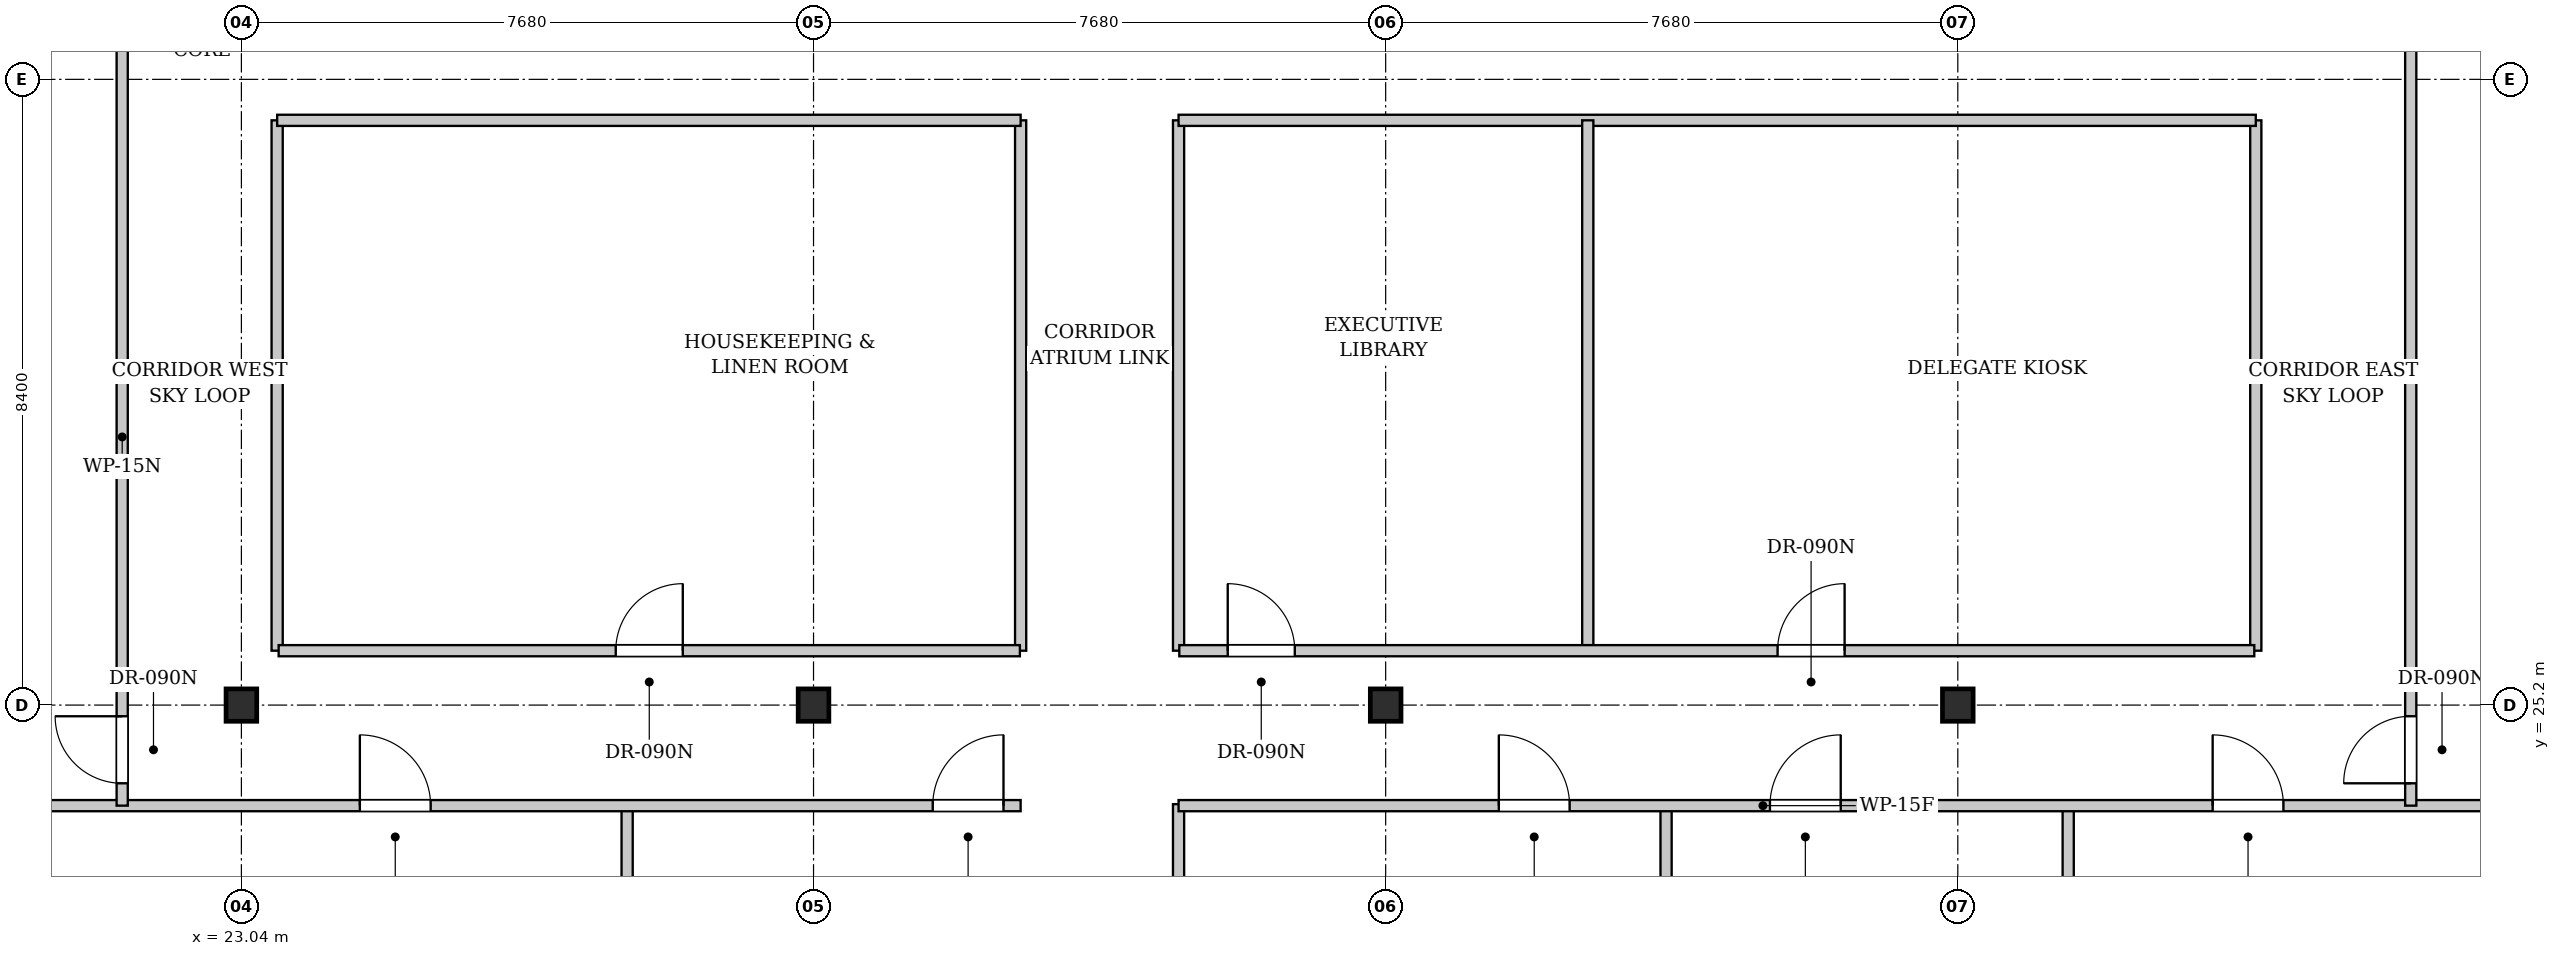
"""IFC4 building model, lengths in metres.
Left out: names, types, materials, properties, quantities, classifications, styles, units other than length and angle.
Written with IfcOpenShell. Run it as: python <this file> out.ifc"""

import sys

from ifc_helpers import new_model, si_unit, direction, frame, frame_2d, origin, origin_2d, place, context, subcontext, project, spatial, rectangle, i_section, extrude, element, fill, save


model = new_model("IFC4")
c1 = context("Model", 3, precision=1e-05, world=origin(), true_north=direction((0.0, 1.0)))
c2 = subcontext(c1, "Body", "Model", "MODEL_VIEW")
j1 = project(units=[si_unit("LENGTHUNIT", "METRE"), si_unit("PLANEANGLEUNIT", "RADIAN")], contexts=[c1])
p1 = place(None, origin())
s1 = spatial("IfcSite", under=j1, at=p1, CompositionType="ELEMENT")
p2 = place(p1, origin())
s2 = spatial("IfcBuilding", under=s1, at=p2, CompositionType="ELEMENT")
p3 = place(p2, frame((0.0, 0.0, 221.0)))
s3 = spatial("IfcBuildingStorey", under=s2, at=p3, CompositionType="ELEMENT", Elevation=221.0)
for number, where, z_axis, x_axis in (
    (1, (23.04, 25.2, 0.0), (0.0, 0.0, 1.0), (1.0, 0.0, 0.0)),
    (2, (30.72, 25.2, 0.0), (0.0, 0.0, 1.0), (1.0, 0.0, 0.0)),
    (3, (38.4, 25.2, 0.0), (0.0, 0.0, 1.0), (1.0, 0.0, 0.0)),
    (4, (46.08, 25.2, 0.0), (0.0, 0.0, 1.0), (1.0, 0.0, 0.0)),
):
    element("IfcColumn", number, at=place(p3, frame(where, z_axis=z_axis, x_axis=x_axis)), inside=s3, PredefinedType="COLUMN", context=c2, shape_type="SweptSolid", body=[
        extrude(i_section(OverallWidth=0.412, OverallDepth=0.435, WebThickness=0.036, FlangeThickness=0.058, FilletRadius=0.015, at=origin_2d()), origin(), (0.0, 0.0, 1.0), 3.3),
    ])
p4 = place(p3, frame((28.218, 12.833, 0.0), z_axis=(0.0, 0.0, 1.0), x_axis=(0.0, 1.0, 0.0)))
e5 = element("IfcWall", 5, at=p4, inside=s3, PredefinedType="PARTITIONING", context=c2, shape_type="SweptSolid", body=[
    extrude(rectangle(XDim=11.038, YDim=0.15, at=frame_2d((5.519, 0.0))), origin(), (0.0, 0.0, 1.0), 3.08),
])
p5 = place(p3, frame((35.62, 13.611, 0.0), z_axis=(0.0, 0.0, 1.0), x_axis=(0.0, 1.0, 0.0)))
e6 = element("IfcWall", 6, at=p5, inside=s3, PredefinedType="PARTITIONING", context=c2, shape_type="SweptSolid", body=[
    extrude(rectangle(XDim=10.26, YDim=0.15, at=frame_2d((5.13, 0.0))), origin(), (0.0, 0.0, 1.0), 3.08),
])
p6 = place(p3, frame((42.164, 14.298, 0.0), z_axis=(0.0, 0.0, 1.0), x_axis=(0.0, 1.0, 0.0)))
e7 = element("IfcWall", 7, at=p6, inside=s3, PredefinedType="PARTITIONING", context=c2, shape_type="SweptSolid", body=[
    extrude(rectangle(XDim=9.572, YDim=0.15, at=frame_2d((4.786, 0.0))), origin(), (0.0, 0.0, 1.0), 3.08),
])
p7 = place(p3, frame((47.562, 14.866, 0.0), z_axis=(0.0, 0.0, 1.0), x_axis=(0.0, 1.0, 0.0)))
e8 = element("IfcWall", 8, at=p7, inside=s3, PredefinedType="PARTITIONING", context=c2, shape_type="SweptSolid", body=[
    extrude(rectangle(XDim=9.004, YDim=0.15, at=frame_2d((4.502, 0.0))), origin(), (0.0, 0.0, 1.0), 3.08),
])
p8 = place(p3, frame((17.44, 23.85, 0.0), z_axis=(0.0, 0.0, 1.0), x_axis=(1.0, 0.0, 0.0)))
e9 = element("IfcWall", 9, at=p8, inside=s3, PredefinedType="PARTITIONING", context=c2, shape_type="SweptSolid", body=[
    extrude(rectangle(XDim=16.06, YDim=0.15, at=frame_2d((8.03, 0.0))), origin(), (0.0, 0.0, 1.0), 3.08),
])
p9 = place(p8, frame((7.19, 0.0, 0.0)))
e10 = element("IfcOpeningElement", 10, at=p9, cuts=e9, PredefinedType="OPENING", context=c2, shape_type="SweptSolid", body=[
    extrude(rectangle(XDim=0.95, YDim=2.15, at=frame_2d((0.475, 1.075))), frame((0.0, 0.085, 0.0), z_axis=(0.0, -1.0, 0.0), x_axis=(1.0, 0.0, 0.0)), (0.0, 0.0, 1.0), 0.17),
])
p10 = place(p8, frame((14.88, 0.0, 0.0)))
e11 = element("IfcOpeningElement", 11, at=p10, cuts=e9, PredefinedType="OPENING", context=c2, shape_type="SweptSolid", body=[
    extrude(rectangle(XDim=0.95, YDim=2.15, at=frame_2d((0.475, 1.075))), frame((0.0, 0.085, 0.0), z_axis=(0.0, -1.0, 0.0), x_axis=(1.0, 0.0, 0.0)), (0.0, 0.0, 1.0), 0.17),
])
p11 = place(p3, frame((35.62, 23.85, 0.0), z_axis=(0.0, 0.0, 1.0), x_axis=(1.0, 0.0, 0.0)))
e12 = element("IfcWall", 12, at=p11, inside=s3, PredefinedType="PARTITIONING", context=c2, shape_type="SweptSolid", body=[
    extrude(rectangle(XDim=35.655, YDim=0.15, at=frame_2d((17.828, 0.0))), origin(), (0.0, 0.0, 1.0), 3.08),
])
p12 = place(p11, frame((4.299, 0.0, 0.0)))
e13 = element("IfcOpeningElement", 13, at=p12, cuts=e12, PredefinedType="OPENING", context=c2, shape_type="SweptSolid", body=[
    extrude(rectangle(XDim=0.95, YDim=2.15, at=frame_2d((0.475, 1.075))), frame((0.0, 0.085, 0.0), z_axis=(0.0, -1.0, 0.0), x_axis=(1.0, 0.0, 0.0)), (0.0, 0.0, 1.0), 0.17),
])
p13 = place(p11, frame((7.938, 0.0, 0.0)))
e14 = element("IfcOpeningElement", 14, at=p13, cuts=e12, PredefinedType="OPENING", context=c2, shape_type="SweptSolid", body=[
    extrude(rectangle(XDim=0.95, YDim=2.15, at=frame_2d((0.475, 1.075))), frame((0.0, 0.085, 0.0), z_axis=(0.0, -1.0, 0.0), x_axis=(1.0, 0.0, 0.0)), (0.0, 0.0, 1.0), 0.17),
])
p14 = place(p11, frame((13.881, 0.0, 0.0)))
e15 = element("IfcOpeningElement", 15, at=p14, cuts=e12, PredefinedType="OPENING", context=c2, shape_type="SweptSolid", body=[
    extrude(rectangle(XDim=0.95, YDim=2.15, at=frame_2d((0.475, 1.075))), frame((0.0, 0.085, 0.0), z_axis=(0.0, -1.0, 0.0), x_axis=(1.0, 0.0, 0.0)), (0.0, 0.0, 1.0), 0.17),
])
p15 = place(p3, frame((21.44, 23.85, 0.0), z_axis=(0.0, 0.0, 1.0), x_axis=(0.0, 1.0, 0.0)))
e16 = element("IfcWall", 16, at=p15, inside=s3, PredefinedType="PARTITIONING", context=c2, shape_type="SweptSolid", body=[
    extrude(rectangle(XDim=22.498, YDim=0.15, at=frame_2d((11.249, 0.0))), origin(), (0.0, 0.0, 1.0), 3.08),
])
p16 = place(p15, frame((0.3, 0.0, 0.0)))
e17 = element("IfcOpeningElement", 17, at=p16, cuts=e16, PredefinedType="OPENING", context=c2, shape_type="SweptSolid", body=[
    extrude(rectangle(XDim=0.9, YDim=2.15, at=frame_2d((0.45, 1.075))), frame((0.0, 0.085, 0.0), z_axis=(0.0, -1.0, 0.0), x_axis=(1.0, 0.0, 0.0)), (0.0, 0.0, 1.0), 0.17),
])
p17 = place(p3, frame((52.16, 23.85, 0.0), z_axis=(0.0, 0.0, 1.0), x_axis=(0.0, 1.0, 0.0)))
e18 = element("IfcWall", 18, at=p17, inside=s3, PredefinedType="PARTITIONING", context=c2, shape_type="SweptSolid", body=[
    extrude(rectangle(XDim=11.29, YDim=0.15, at=frame_2d((5.645, 0.0))), origin(), (0.0, 0.0, 1.0), 3.08),
])
p18 = place(p17, frame((0.3, 0.0, 0.0)))
e19 = element("IfcOpeningElement", 19, at=p18, cuts=e18, PredefinedType="OPENING", context=c2, shape_type="SweptSolid", body=[
    extrude(rectangle(XDim=0.9, YDim=2.15, at=frame_2d((0.45, 1.075))), frame((0.0, 0.085, 0.0), z_axis=(0.0, -1.0, 0.0), x_axis=(1.0, 0.0, 0.0)), (0.0, 0.0, 1.0), 0.17),
])
for number, where, z_axis, x_axis in (
    (20, (23.52, 25.93, 0.0), (0.0, 0.0, 1.0), (0.0, 1.0, 0.0)),
    (21, (50.08, 25.93, 0.0), (0.0, 0.0, 1.0), (0.0, 1.0, 0.0)),
    (22, (33.5, 25.93, 0.0), (0.0, 0.0, 1.0), (0.0, 1.0, 0.0)),
    (23, (35.62, 25.93, 0.0), (0.0, 0.0, 1.0), (0.0, 1.0, 0.0)),
):
    element("IfcWall", number, at=place(p3, frame(where, z_axis=z_axis, x_axis=x_axis)), inside=s3, PredefinedType="PARTITIONING", context=c2, shape_type="SweptSolid", body=[
        extrude(rectangle(XDim=7.12, YDim=0.15, at=frame_2d((3.56, 0.0))), origin(), (0.0, 0.0, 1.0), 3.08),
    ])
p19 = place(p3, frame((23.52, 33.05, 0.0), z_axis=(0.0, 0.0, 1.0), x_axis=(1.0, 0.0, 0.0)))
e24 = element("IfcWall", 24, at=p19, inside=s3, PredefinedType="PARTITIONING", context=c2, shape_type="SweptSolid", body=[
    extrude(rectangle(XDim=9.98, YDim=0.15, at=frame_2d((4.99, 0.0))), origin(), (0.0, 0.0, 1.0), 3.08),
])
p20 = place(p3, frame((35.62, 33.05, 0.0), z_axis=(0.0, 0.0, 1.0), x_axis=(1.0, 0.0, 0.0)))
e25 = element("IfcWall", 25, at=p20, inside=s3, PredefinedType="PARTITIONING", context=c2, shape_type="SweptSolid", body=[
    extrude(rectangle(XDim=14.46, YDim=0.15, at=frame_2d((7.23, 0.0))), origin(), (0.0, 0.0, 1.0), 3.08),
])
p21 = place(p3, frame((23.54, 25.93, 0.0), z_axis=(0.0, 0.0, 1.0), x_axis=(1.0, 0.0, 0.0)))
e26 = element("IfcWall", 26, at=p21, inside=s3, PredefinedType="PARTITIONING", context=c2, shape_type="SweptSolid", body=[
    extrude(rectangle(XDim=9.95, YDim=0.15, at=frame_2d((4.975, 0.0))), origin(), (0.0, 0.0, 1.0), 3.08),
])
p22 = place(p21, frame((4.525, 0.0, 0.0)))
e27 = element("IfcOpeningElement", 27, at=p22, cuts=e26, PredefinedType="OPENING", context=c2, shape_type="SweptSolid", body=[
    extrude(rectangle(XDim=0.9, YDim=2.15, at=frame_2d((0.45, 1.075))), frame((0.0, 0.085, 0.0), z_axis=(0.0, -1.0, 0.0), x_axis=(1.0, 0.0, 0.0)), (0.0, 0.0, 1.0), 0.17),
])
p23 = place(p3, frame((41.113, 25.93, 0.0), z_axis=(0.0, 0.0, 1.0), x_axis=(0.0, 1.0, 0.0)))
e28 = element("IfcWall", 28, at=p23, inside=s3, PredefinedType="PARTITIONING", context=c2, shape_type="SweptSolid", body=[
    extrude(rectangle(XDim=7.12, YDim=0.15, at=frame_2d((3.56, 0.0))), origin(), (0.0, 0.0, 1.0), 3.08),
])
p24 = place(p3, frame((35.63, 25.93, 0.0), z_axis=(0.0, 0.0, 1.0), x_axis=(1.0, 0.0, 0.0)))
e29 = element("IfcWall", 29, at=p24, inside=s3, PredefinedType="PARTITIONING", context=c2, shape_type="SweptSolid", body=[
    extrude(rectangle(XDim=14.43, YDim=0.15, at=frame_2d((7.215, 0.0))), origin(), (0.0, 0.0, 1.0), 3.08),
])
p25 = place(p24, frame((0.65, 0.0, 0.0)))
e30 = element("IfcOpeningElement", 30, at=p25, cuts=e29, PredefinedType="OPENING", context=c2, shape_type="SweptSolid", body=[
    extrude(rectangle(XDim=0.9, YDim=2.15, at=frame_2d((0.45, 1.075))), frame((0.0, 0.085, 0.0), z_axis=(0.0, -1.0, 0.0), x_axis=(1.0, 0.0, 0.0)), (0.0, 0.0, 1.0), 0.17),
])
p26 = place(p24, frame((8.031, 0.0, 0.0)))
e31 = element("IfcOpeningElement", 31, at=p26, cuts=e29, PredefinedType="OPENING", context=c2, shape_type="SweptSolid", body=[
    extrude(rectangle(XDim=0.9, YDim=2.15, at=frame_2d((0.45, 1.075))), frame((0.0, 0.085, 0.0), z_axis=(0.0, -1.0, 0.0), x_axis=(1.0, 0.0, 0.0)), (0.0, 0.0, 1.0), 0.17),
])
p27 = place(p9, origin())
e32 = element("IfcDoor", 32, at=p27, inside=s3, OperationType="SINGLE_SWING_LEFT", PredefinedType="DOOR", context=c2, shape_type="SweptSolid", body=[
    extrude(rectangle(XDim=0.95, YDim=2.15, at=frame_2d((0.475, 1.075))), frame((0.0, 0.025, 0.0), z_axis=(0.0, -1.0, 0.0), x_axis=(1.0, 0.0, 0.0)), (0.0, 0.0, 1.0), 0.05),
])
fill(e10, e32)
p28 = place(p10, origin())
e33 = element("IfcDoor", 33, at=p28, inside=s3, OperationType="SINGLE_SWING_RIGHT", PredefinedType="DOOR", context=c2, shape_type="SweptSolid", body=[
    extrude(rectangle(XDim=0.95, YDim=2.15, at=frame_2d((0.475, 1.075))), frame((0.0, 0.025, 0.0), z_axis=(0.0, -1.0, 0.0), x_axis=(1.0, 0.0, 0.0)), (0.0, 0.0, 1.0), 0.05),
])
fill(e11, e33)
p29 = place(p12, origin())
e34 = element("IfcDoor", 34, at=p29, inside=s3, OperationType="SINGLE_SWING_LEFT", PredefinedType="DOOR", context=c2, shape_type="SweptSolid", body=[
    extrude(rectangle(XDim=0.95, YDim=2.15, at=frame_2d((0.475, 1.075))), frame((0.0, 0.025, 0.0), z_axis=(0.0, -1.0, 0.0), x_axis=(1.0, 0.0, 0.0)), (0.0, 0.0, 1.0), 0.05),
])
fill(e13, e34)
p30 = place(p13, origin())
e35 = element("IfcDoor", 35, at=p30, inside=s3, OperationType="SINGLE_SWING_RIGHT", PredefinedType="DOOR", context=c2, shape_type="SweptSolid", body=[
    extrude(rectangle(XDim=0.95, YDim=2.15, at=frame_2d((0.475, 1.075))), frame((0.0, 0.025, 0.0), z_axis=(0.0, -1.0, 0.0), x_axis=(1.0, 0.0, 0.0)), (0.0, 0.0, 1.0), 0.05),
])
fill(e14, e35)
p31 = place(p14, origin())
e36 = element("IfcDoor", 36, at=p31, inside=s3, OperationType="SINGLE_SWING_LEFT", PredefinedType="DOOR", context=c2, shape_type="SweptSolid", body=[
    extrude(rectangle(XDim=0.95, YDim=2.15, at=frame_2d((0.475, 1.075))), frame((0.0, 0.025, 0.0), z_axis=(0.0, -1.0, 0.0), x_axis=(1.0, 0.0, 0.0)), (0.0, 0.0, 1.0), 0.05),
])
fill(e15, e36)
p32 = place(p16, origin())
e37 = element("IfcDoor", 37, at=p32, inside=s3, OperationType="SINGLE_SWING_RIGHT", PredefinedType="DOOR", context=c2, shape_type="SweptSolid", body=[
    extrude(rectangle(XDim=0.9, YDim=2.15, at=frame_2d((0.45, 1.075))), frame((0.0, 0.025, 0.0), z_axis=(0.0, -1.0, 0.0), x_axis=(1.0, 0.0, 0.0)), (0.0, 0.0, 1.0), 0.05),
])
fill(e17, e37)
p33 = place(p18, origin())
e38 = element("IfcDoor", 38, at=p33, inside=s3, OperationType="SINGLE_SWING_LEFT", PredefinedType="DOOR", context=c2, shape_type="SweptSolid", body=[
    extrude(rectangle(XDim=0.9, YDim=2.15, at=frame_2d((0.45, 1.075))), frame((0.0, 0.025, 0.0), z_axis=(0.0, -1.0, 0.0), x_axis=(1.0, 0.0, 0.0)), (0.0, 0.0, 1.0), 0.05),
])
fill(e19, e38)
p34 = place(p22, origin())
e39 = element("IfcDoor", 39, at=p34, inside=s3, OperationType="SINGLE_SWING_RIGHT", PredefinedType="DOOR", context=c2, shape_type="SweptSolid", body=[
    extrude(rectangle(XDim=0.9, YDim=2.15, at=frame_2d((0.45, 1.075))), frame((0.0, 0.025, 0.0), z_axis=(0.0, -1.0, 0.0), x_axis=(1.0, 0.0, 0.0)), (0.0, 0.0, 1.0), 0.05),
])
fill(e27, e39)
p35 = place(p25, origin())
e40 = element("IfcDoor", 40, at=p35, inside=s3, OperationType="SINGLE_SWING_LEFT", PredefinedType="DOOR", context=c2, shape_type="SweptSolid", body=[
    extrude(rectangle(XDim=0.9, YDim=2.15, at=frame_2d((0.45, 1.075))), frame((0.0, 0.025, 0.0), z_axis=(0.0, -1.0, 0.0), x_axis=(1.0, 0.0, 0.0)), (0.0, 0.0, 1.0), 0.05),
])
fill(e30, e40)
p36 = place(p26, origin())
e41 = element("IfcDoor", 41, at=p36, inside=s3, OperationType="SINGLE_SWING_RIGHT", PredefinedType="DOOR", context=c2, shape_type="SweptSolid", body=[
    extrude(rectangle(XDim=0.9, YDim=2.15, at=frame_2d((0.45, 1.075))), frame((0.0, 0.025, 0.0), z_axis=(0.0, -1.0, 0.0), x_axis=(1.0, 0.0, 0.0)), (0.0, 0.0, 1.0), 0.05),
])
fill(e31, e41)
save(model, sys.argv[1])
